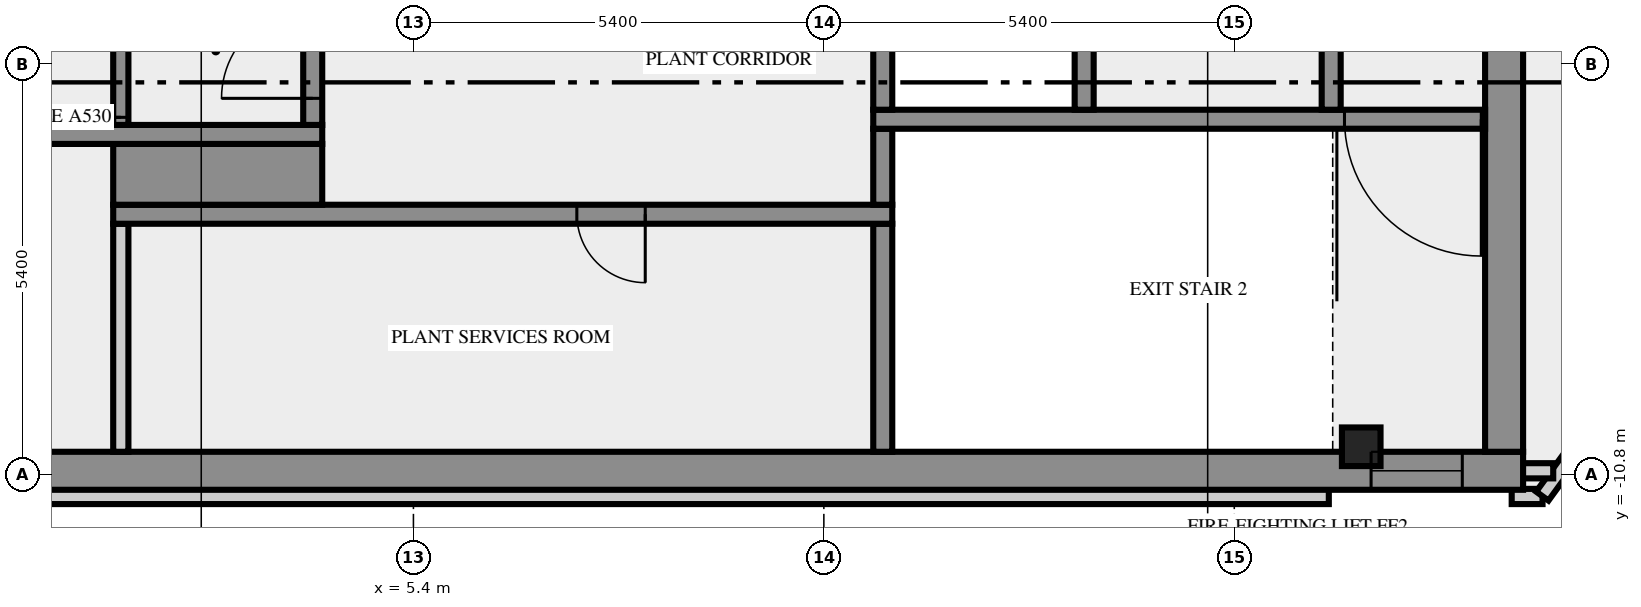
"""IFC4 building model, lengths in metres.
Left out: names, types, materials, properties, quantities, classifications, styles, units other than length and angle.
Written with IfcOpenShell. Run it as: python <this file> out.ifc"""

import sys

from ifc_helpers import new_model, si_unit, direction, frame, frame_2d, origin, origin_2d, place, context, subcontext, project, spatial, rectangle, hollow_rectangle, extrude, element, fill, save


model = new_model("IFC4")
c1 = context("Model", 3, precision=1e-05, world=origin(), true_north=direction((0.0, 1.0)))
c2 = subcontext(c1, "Body", "Model", "MODEL_VIEW")
j1 = project(units=[si_unit("LENGTHUNIT", "METRE"), si_unit("PLANEANGLEUNIT", "RADIAN")], contexts=[c1])
p1 = place(None, origin())
s1 = spatial("IfcSite", under=j1, at=p1, CompositionType="ELEMENT")
p2 = place(p1, origin())
s2 = spatial("IfcBuilding", under=s1, at=p2, CompositionType="ELEMENT")
p3 = place(p2, frame((0.0, 0.0, 363.0)))
s3 = spatial("IfcBuildingStorey", under=s2, at=p3, CompositionType="ELEMENT", Elevation=363.0)
p4 = place(p3, frame((17.87, -10.434, 0.0), z_axis=(0.0, 0.0, 1.0), x_axis=(1.0, 0.0, 0.0)))
e1 = element("IfcColumn", 1, at=p4, inside=s3, PredefinedType="COLUMN", context=c2, shape_type="SweptSolid", body=[
    extrude(hollow_rectangle(XDim=0.508, YDim=0.508, WallThickness=0.016, at=origin_2d()), origin(), (0.0, 0.0, 1.0), 4.75),
])
p5 = place(p3, frame((-17.444, -11.088, 0.0), z_axis=(0.0, 0.0, 1.0), x_axis=(1.0, 0.0, 0.0)))
e2 = element("IfcWall", 2, at=p5, inside=s3, PredefinedType="SOLIDWALL", context=c2, shape_type="SweptSolid", body=[
    extrude(rectangle(XDim=34.888, YDim=0.2, at=frame_2d((17.444, 0.0))), origin(), (0.0, 0.0, 1.0), 4.75),
])
p6 = place(p3, frame((19.85, -11.088, 0.0), z_axis=(0.0, 0.0, 1.0), x_axis=(1.0, 0.0, 0.0)))
e3 = element("IfcWall", 3, at=p6, inside=s3, PredefinedType="SOLIDWALL", context=c2, shape_type="SweptSolid", body=[
    extrude(rectangle(XDim=0.406, YDim=0.2, at=frame_2d((0.203, 0.0))), origin(), (0.0, 0.0, 1.0), 4.75),
])
p7 = place(p3, frame((20.253, -11.083, 0.0), z_axis=(0.0, 0.0, 1.0), x_axis=(0.587766567315, 0.809030569476, 0.0)))
e4 = element("IfcWall", 4, at=p7, inside=s3, PredefinedType="SOLIDWALL", context=c2, shape_type="SweptSolid", body=[
    extrude(rectangle(XDim=2.688, YDim=0.2, at=frame_2d((1.344, 0.0))), origin(), (0.0, 0.0, 1.0), 4.75),
])
p8 = place(p3, frame((24.274, -7.992, 0.0), z_axis=(0.0, 0.0, 1.0), x_axis=(-0.453998845176, 0.891002271927, 0.0)))
e5 = element("IfcWall", 5, at=p8, inside=s3, PredefinedType="SOLIDWALL", context=c2, shape_type="SweptSolid", body=[
    extrude(rectangle(XDim=20.973, YDim=0.2, at=frame_2d((10.487, 0.0))), origin(), (0.0, 0.0, 1.0), 4.75),
])
p9 = place(p8, frame((0.81, 0.0, 1.0)))
e6 = element("IfcOpeningElement", 6, at=p9, cuts=e5, PredefinedType="OPENING", context=c2, shape_type="SweptSolid", body=[
    extrude(rectangle(XDim=3.0, YDim=2.8, at=frame_2d((1.5, 1.4))), frame((0.0, 0.11, 0.0), z_axis=(0.0, -1.0, 0.0), x_axis=(1.0, 0.0, 0.0)), (0.0, 0.0, 1.0), 0.22),
])
p10 = place(p8, frame((5.928, 0.0, 1.0)))
e7 = element("IfcOpeningElement", 7, at=p10, cuts=e5, PredefinedType="OPENING", context=c2, shape_type="SweptSolid", body=[
    extrude(rectangle(XDim=3.0, YDim=2.8, at=frame_2d((1.5, 1.4))), frame((0.0, 0.11, 0.0), z_axis=(0.0, -1.0, 0.0), x_axis=(1.0, 0.0, 0.0)), (0.0, 0.0, 1.0), 0.22),
])
p11 = place(p8, frame((11.544, 0.0, 1.0)))
e8 = element("IfcOpeningElement", 8, at=p11, cuts=e5, PredefinedType="OPENING", context=c2, shape_type="SweptSolid", body=[
    extrude(rectangle(XDim=3.0, YDim=2.8, at=frame_2d((1.5, 1.4))), frame((0.0, 0.11, 0.0), z_axis=(0.0, -1.0, 0.0), x_axis=(1.0, 0.0, 0.0)), (0.0, 0.0, 1.0), 0.22),
])
p12 = place(p8, frame((16.913, 0.0, 1.0)))
e9 = element("IfcOpeningElement", 9, at=p12, cuts=e5, PredefinedType="OPENING", context=c2, shape_type="SweptSolid", body=[
    extrude(rectangle(XDim=3.0, YDim=2.8, at=frame_2d((1.5, 1.4))), frame((0.0, 0.11, 0.0), z_axis=(0.0, -1.0, 0.0), x_axis=(1.0, 0.0, 0.0)), (0.0, 0.0, 1.0), 0.22),
])
p13 = place(p3, frame((19.98, -10.75, 0.0), z_axis=(0.0, 0.0, 1.0), x_axis=(1.0, 0.0, 0.0)))
e10 = element("IfcWall", 10, at=p13, inside=s3, PredefinedType="SOLIDWALL", context=c2, shape_type="SweptSolid", body=[
    extrude(rectangle(XDim=0.417, YDim=0.2, at=frame_2d((0.208, 0.0))), origin(), (0.0, 0.0, 1.0), 4.75),
])
p14 = place(p3, frame((-20.0, -10.75, 0.0), z_axis=(0.0, 0.0, 1.0), x_axis=(1.0, 0.0, 0.0)))
e11 = element("IfcWall", 11, at=p14, inside=s3, PredefinedType="SHEAR", context=c2, shape_type="SweptSolid", body=[
    extrude(rectangle(XDim=40.0, YDim=0.5, at=frame_2d((20.0, 0.0))), origin(), (0.0, 0.0, 1.0), 4.75),
])
p15 = place(p14, frame((0.8, 0.0, 1.0)))
e12 = element("IfcOpeningElement", 12, at=p15, cuts=e11, PredefinedType="OPENING", context=c2, shape_type="SweptSolid", body=[
    extrude(rectangle(XDim=1.2, YDim=1.2, at=frame_2d((0.6, 0.6))), frame((0.0, 0.26, 0.0), z_axis=(0.0, -1.0, 0.0), x_axis=(1.0, 0.0, 0.0)), (0.0, 0.0, 1.0), 0.52),
])
p16 = place(p14, frame((38.0, 0.0, 1.0)))
e13 = element("IfcOpeningElement", 13, at=p16, cuts=e11, PredefinedType="OPENING", context=c2, shape_type="SweptSolid", body=[
    extrude(rectangle(XDim=1.2, YDim=1.2, at=frame_2d((0.6, 0.6))), frame((0.0, 0.26, 0.0), z_axis=(0.0, -1.0, 0.0), x_axis=(1.0, 0.0, 0.0)), (0.0, 0.0, 1.0), 0.52),
])
p17 = place(p3, frame((1.55, -10.5, 0.0), z_axis=(0.0, 0.0, 1.0), x_axis=(0.0, 1.0, 0.0)))
e14 = element("IfcWall", 14, at=p17, inside=s3, PredefinedType="SOLIDWALL", context=c2, shape_type="SweptSolid", body=[
    extrude(rectangle(XDim=3.0, YDim=0.2, at=frame_2d((1.5, 0.0))), origin(), (0.0, 0.0, 1.0), 4.75),
])
p18 = place(p3, frame((11.575, -10.5, 0.0), z_axis=(0.0, 0.0, 1.0), x_axis=(0.0, 1.0, 0.0)))
e15 = element("IfcWall", 15, at=p18, inside=s3, PredefinedType="SHEAR", context=c2, shape_type="SweptSolid", body=[
    extrude(rectangle(XDim=3.0, YDim=0.25, at=frame_2d((1.5, 0.0))), origin(), (0.0, 0.0, 1.0), 4.75),
])
p19 = place(p3, frame((19.75, -10.5, 0.0), z_axis=(0.0, 0.0, 1.0), x_axis=(0.0, 1.0, 0.0)))
e16 = element("IfcWall", 16, at=p19, inside=s3, PredefinedType="SHEAR", context=c2, shape_type="SweptSolid", body=[
    extrude(rectangle(XDim=8.8, YDim=0.5, at=frame_2d((4.4, 0.0))), origin(), (0.0, 0.0, 1.0), 4.75),
])
p20 = place(p3, frame((11.7, -7.375, 0.0), z_axis=(0.0, 0.0, 1.0), x_axis=(-1.0, 0.0, 0.0)))
e17 = element("IfcWall", 17, at=p20, inside=s3, PredefinedType="SHEAR", context=c2, shape_type="SweptSolid", body=[
    extrude(rectangle(XDim=10.25, YDim=0.25, at=frame_2d((5.125, 0.0))), origin(), (0.0, 0.0, 1.0), 4.75),
])
p21 = place(p20, frame((3.25, 0.0, 0.0)))
e18 = element("IfcOpeningElement", 18, at=p21, cuts=e17, PredefinedType="OPENING", context=c2, shape_type="SweptSolid", body=[
    extrude(rectangle(XDim=0.9, YDim=2.1, at=frame_2d((0.45, 1.05))), frame((0.0, 0.135, 0.0), z_axis=(0.0, -1.0, 0.0), x_axis=(1.0, 0.0, 0.0)), (0.0, 0.0, 1.0), 0.27),
])
p22 = place(p3, frame((1.45, -6.85, 0.0), z_axis=(0.0, 0.0, 1.0), x_axis=(1.0, 0.0, 0.0)))
e19 = element("IfcWall", 19, at=p22, inside=s3, PredefinedType="SHEAR", context=c2, shape_type="SweptSolid", body=[
    extrude(rectangle(XDim=2.75, YDim=0.8, at=frame_2d((1.375, 0.0))), origin(), (0.0, 0.0, 1.0), 4.75),
])
p23 = place(p3, frame((11.575, -7.25, 0.0), z_axis=(0.0, 0.0, 1.0), x_axis=(0.0, 1.0, 0.0)))
e20 = element("IfcWall", 20, at=p23, inside=s3, PredefinedType="SHEAR", context=c2, shape_type="SweptSolid", body=[
    extrude(rectangle(XDim=1.0, YDim=0.25, at=frame_2d((0.5, 0.0))), origin(), (0.0, 0.0, 1.0), 4.75),
])
p24 = place(p3, frame((-6.55, -6.325, 0.0), z_axis=(0.0, 0.0, 1.0), x_axis=(1.0, 0.0, 0.0)))
e21 = element("IfcWall", 21, at=p24, inside=s3, PredefinedType="SHEAR", context=c2, shape_type="SweptSolid", body=[
    extrude(rectangle(XDim=10.75, YDim=0.25, at=frame_2d((5.375, 0.0))), origin(), (0.0, 0.0, 1.0), 4.75),
])
p25 = place(p3, frame((19.5, -6.125, 0.0), z_axis=(0.0, 0.0, 1.0), x_axis=(-1.0, 0.0, 0.0)))
e22 = element("IfcWall", 22, at=p25, inside=s3, PredefinedType="SHEAR", context=c2, shape_type="SweptSolid", body=[
    extrude(rectangle(XDim=8.05, YDim=0.25, at=frame_2d((4.025, 0.0))), origin(), (0.0, 0.0, 1.0), 4.75),
])
p26 = place(p25, frame((0.05, 0.0, 0.0)))
e23 = element("IfcOpeningElement", 23, at=p26, cuts=e22, PredefinedType="OPENING", context=c2, shape_type="SweptSolid", body=[
    extrude(rectangle(XDim=1.8, YDim=2.1, at=frame_2d((0.9, 1.05))), frame((0.0, 0.135, 0.0), z_axis=(0.0, -1.0, 0.0), x_axis=(1.0, 0.0, 0.0)), (0.0, 0.0, 1.0), 0.27),
])
p27 = place(p3, frame((1.55, -6.2, 0.0), z_axis=(0.0, 0.0, 1.0), x_axis=(0.0, 1.0, 0.0)))
e24 = element("IfcWall", 24, at=p27, inside=s3, PredefinedType="SHEAR", context=c2, shape_type="SweptSolid", body=[
    extrude(rectangle(XDim=1.95, YDim=0.2, at=frame_2d((0.975, 0.0))), origin(), (0.0, 0.0, 1.0), 4.75),
])
p28 = place(p27, frame((0.1, 0.0, 0.0)))
e25 = element("IfcOpeningElement", 25, at=p28, cuts=e24, PredefinedType="OPENING", context=c2, shape_type="SweptSolid", body=[
    extrude(rectangle(XDim=1.7, YDim=2.1, at=frame_2d((0.85, 1.05))), frame((0.0, 0.11, 0.0), z_axis=(0.0, -1.0, 0.0), x_axis=(1.0, 0.0, 0.0)), (0.0, 0.0, 1.0), 0.22),
])
p29 = place(p3, frame((4.075, -6.2, 0.0), z_axis=(0.0, 0.0, 1.0), x_axis=(0.0, 1.0, 0.0)))
e26 = element("IfcWall", 26, at=p29, inside=s3, PredefinedType="SHEAR", context=c2, shape_type="SweptSolid", body=[
    extrude(rectangle(XDim=1.95, YDim=0.25, at=frame_2d((0.975, 0.0))), origin(), (0.0, 0.0, 1.0), 4.75),
])
p30 = place(p29, frame((0.35, 0.0, 0.0)))
e27 = element("IfcOpeningElement", 27, at=p30, cuts=e26, PredefinedType="OPENING", context=c2, shape_type="SweptSolid", body=[
    extrude(rectangle(XDim=1.2, YDim=2.1, at=frame_2d((0.6, 1.05))), frame((0.0, 0.135, 0.0), z_axis=(0.0, -1.0, 0.0), x_axis=(1.0, 0.0, 0.0)), (0.0, 0.0, 1.0), 0.27),
])
for number, where, z_axis, x_axis in (
    (28, (11.575, -6.0, 0.0), (0.0, 0.0, 1.0), (0.0, 1.0, 0.0)),
    (29, (14.225, -6.0, 0.0), (0.0, 0.0, 1.0), (0.0, 1.0, 0.0)),
    (30, (17.475, -6.0, 0.0), (0.0, 0.0, 1.0), (0.0, 1.0, 0.0)),
):
    element("IfcWall", number, at=place(p3, frame(where, z_axis=z_axis, x_axis=x_axis)), inside=s3, PredefinedType="SHEAR", context=c2, shape_type="SweptSolid", body=[
        extrude(rectangle(XDim=4.3, YDim=0.25, at=frame_2d((2.15, 0.0))), origin(), (0.0, 0.0, 1.0), 4.75),
    ])
p31 = place(p16, origin())
e31 = element("IfcWindow", 31, at=p31, inside=s3, PartitioningType="SINGLE_PANEL", PredefinedType="WINDOW", context=c2, shape_type="SweptSolid", body=[
    extrude(rectangle(XDim=1.2, YDim=1.2, at=frame_2d((0.6, 0.6))), frame((0.0, 0.03, 0.0), z_axis=(0.0, -1.0, 0.0), x_axis=(1.0, 0.0, 0.0)), (0.0, 0.0, 1.0), 0.06),
])
fill(e13, e31)
p32 = place(p21, origin())
e32 = element("IfcDoor", 32, at=p32, inside=s3, OperationType="SINGLE_SWING_LEFT", PredefinedType="DOOR", context=c2, shape_type="SweptSolid", body=[
    extrude(rectangle(XDim=0.9, YDim=2.1, at=frame_2d((0.45, 1.05))), frame((0.0, 0.025, 0.0), z_axis=(0.0, -1.0, 0.0), x_axis=(1.0, 0.0, 0.0)), (0.0, 0.0, 1.0), 0.05),
])
fill(e18, e32)
p33 = place(p26, origin())
e33 = element("IfcDoor", 33, at=p33, inside=s3, OperationType="DOUBLE_DOOR_SINGLE_SWING", PredefinedType="DOOR", context=c2, shape_type="SweptSolid", body=[
    extrude(rectangle(XDim=1.8, YDim=2.1, at=frame_2d((0.9, 1.05))), frame((0.0, 0.025, 0.0), z_axis=(0.0, -1.0, 0.0), x_axis=(1.0, 0.0, 0.0)), (0.0, 0.0, 1.0), 0.05),
])
fill(e23, e33)
p34 = place(p28, origin())
e34 = element("IfcDoor", 34, at=p34, inside=s3, OperationType="DOUBLE_DOOR_SINGLE_SWING", PredefinedType="DOOR", context=c2, shape_type="SweptSolid", body=[
    extrude(rectangle(XDim=1.7, YDim=2.1, at=frame_2d((0.85, 1.05))), frame((0.0, 0.025, 0.0), z_axis=(0.0, -1.0, 0.0), x_axis=(1.0, 0.0, 0.0)), (0.0, 0.0, 1.0), 0.05),
])
fill(e25, e34)
p35 = place(p30, origin())
e35 = element("IfcDoor", 35, at=p35, inside=s3, OperationType="SINGLE_SWING_LEFT", PredefinedType="DOOR", context=c2, shape_type="SweptSolid", body=[
    extrude(rectangle(XDim=1.2, YDim=2.1, at=frame_2d((0.6, 1.05))), frame((0.0, 0.025, 0.0), z_axis=(0.0, -1.0, 0.0), x_axis=(1.0, 0.0, 0.0)), (0.0, 0.0, 1.0), 0.05),
])
fill(e27, e35)
save(model, sys.argv[1])
